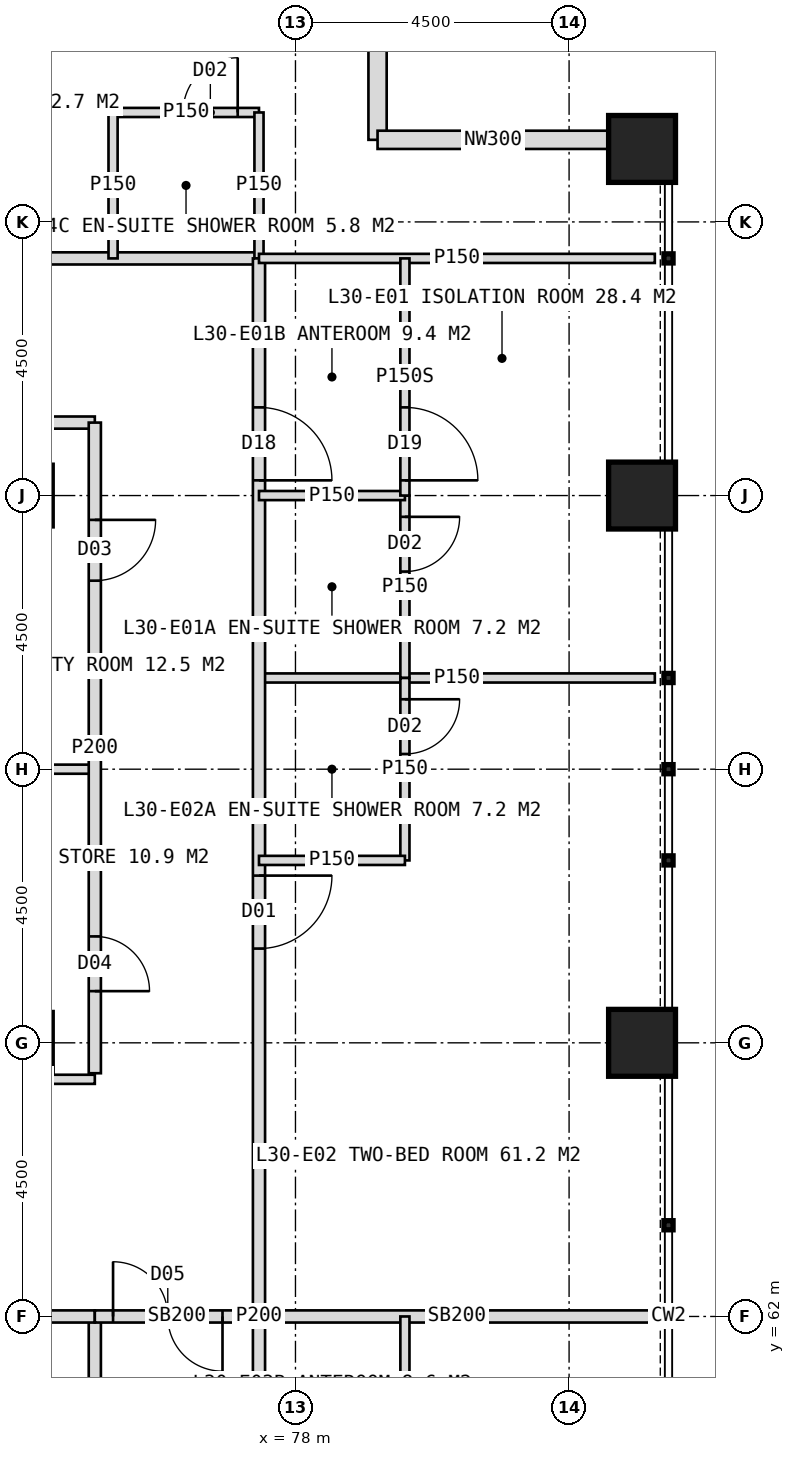
"""IFC4 building model, lengths in metres.
Left out: names, types, materials, properties, quantities, classifications, styles, units other than length and angle.
Written with IfcOpenShell. Run it as: python <this file> out.ifc"""

import sys

from ifc_helpers import new_model, si_unit, direction, frame, frame_2d, origin, origin_2d, place, context, subcontext, project, spatial, rectangle, hollow_rectangle, extrude, element, fill, save


model = new_model("IFC4")
c1 = context("Model", 3, precision=1e-05, world=origin(), true_north=direction((0.0, 1.0)))
c2 = subcontext(c1, "Body", "Model", "MODEL_VIEW")
j1 = project(units=[si_unit("LENGTHUNIT", "METRE"), si_unit("PLANEANGLEUNIT", "RADIAN")], contexts=[c1])
p1 = place(None, origin())
s1 = spatial("IfcSite", under=j1, at=p1, CompositionType="ELEMENT")
p2 = place(p1, origin())
s2 = spatial("IfcBuilding", under=s1, at=p2, CompositionType="ELEMENT")
p3 = place(p2, frame((0.0, 0.0, 128.0)))
s3 = spatial("IfcBuildingStorey", under=s2, at=p3, CompositionType="ELEMENT", Elevation=128.0)
for number, where, z_axis, x_axis in (
    (1, (83.7, 66.5, 0.0), (0.0, 0.0, 1.0), (1.0, 0.0, 0.0)),
    (2, (83.7, 75.5, 0.0), (0.0, 0.0, 1.0), (1.0, 0.0, 0.0)),
    (3, (83.7, 81.2, 0.0), (0.0, 0.0, 1.0), (1.0, 0.0, 0.0)),
):
    element("IfcColumn", number, at=place(p3, frame(where, z_axis=z_axis, x_axis=x_axis)), inside=s3, PredefinedType="COLUMN", context=c2, shape_type="SweptSolid", body=[
        extrude(hollow_rectangle(XDim=1.1, YDim=1.1, WallThickness=0.1, at=origin_2d()), origin(), (0.0, 0.0, 1.0), 4.0),
    ])
for number, where, z_axis, x_axis in (
    (4, (79.35, 85.15, 0.0), (0.0, 0.0, 1.0), (0.0, -1.0, 0.0)),
    (5, (79.35, 81.35, 0.0), (0.0, 0.0, 1.0), (1.0, 0.0, 0.0)),
):
    element("IfcWall", number, at=place(p3, frame(where, z_axis=z_axis, x_axis=x_axis)), inside=s3, PredefinedType="ELEMENTEDWALL", context=c2, shape_type="SweptSolid", body=[
        extrude(rectangle(XDim=3.8, YDim=0.3, at=frame_2d((1.9, 0.0))), origin(), (0.0, 0.0, 1.0), 4.0),
    ])
p4 = place(p3, frame((42.6, 79.4, 0.0), z_axis=(0.0, 0.0, 1.0), x_axis=(1.0, 0.0, 0.0)))
e6 = element("IfcWall", 6, at=p4, inside=s3, PredefinedType="PARTITIONING", context=c2, shape_type="SweptSolid", body=[
    extrude(rectangle(XDim=34.8, YDim=0.2, at=frame_2d((17.4, 0.0))), origin(), (0.0, 0.0, 1.0), 3.75),
])
p5 = place(p4, frame((2.45, 0.0, 0.0)))
e7 = element("IfcOpeningElement", 7, at=p5, cuts=e6, PredefinedType="OPENING", context=c2, shape_type="SweptSolid", body=[
    extrude(rectangle(XDim=1.2, YDim=2.2, at=frame_2d((0.6, 1.1))), frame((0.0, 0.11, 0.0), z_axis=(0.0, -1.0, 0.0), x_axis=(1.0, 0.0, 0.0)), (0.0, 0.0, 1.0), 0.22),
])
p6 = place(p4, frame((10.15, 0.0, 0.0)))
e8 = element("IfcOpeningElement", 8, at=p6, cuts=e6, PredefinedType="OPENING", context=c2, shape_type="SweptSolid", body=[
    extrude(rectangle(XDim=1.2, YDim=2.2, at=frame_2d((0.6, 1.1))), frame((0.0, 0.11, 0.0), z_axis=(0.0, -1.0, 0.0), x_axis=(1.0, 0.0, 0.0)), (0.0, 0.0, 1.0), 0.22),
])
p7 = place(p4, frame((19.8, 0.0, 0.0)))
e9 = element("IfcOpeningElement", 9, at=p7, cuts=e6, PredefinedType="OPENING", context=c2, shape_type="SweptSolid", body=[
    extrude(rectangle(XDim=1.2, YDim=2.2, at=frame_2d((0.6, 1.1))), frame((0.0, 0.11, 0.0), z_axis=(0.0, -1.0, 0.0), x_axis=(1.0, 0.0, 0.0)), (0.0, 0.0, 1.0), 0.22),
])
p8 = place(p4, frame((27.55, 0.0, 0.0)))
e10 = element("IfcOpeningElement", 10, at=p8, cuts=e6, PredefinedType="OPENING", context=c2, shape_type="SweptSolid", body=[
    extrude(rectangle(XDim=1.2, YDim=2.2, at=frame_2d((0.6, 1.1))), frame((0.0, 0.11, 0.0), z_axis=(0.0, -1.0, 0.0), x_axis=(1.0, 0.0, 0.0)), (0.0, 0.0, 1.0), 0.22),
])
p9 = place(p3, frame((75.0, 81.8, 0.0), z_axis=(0.0, 0.0, 1.0), x_axis=(1.0, 0.0, 0.0)))
e11 = element("IfcWall", 11, at=p9, inside=s3, PredefinedType="PARTITIONING", context=c2, shape_type="SweptSolid", body=[
    extrude(rectangle(XDim=2.4, YDim=0.15, at=frame_2d((1.2, 0.0))), origin(), (0.0, 0.0, 1.0), 3.75),
])
p10 = place(p9, frame((1.15, 0.0, 0.0)))
e12 = element("IfcOpeningElement", 12, at=p10, cuts=e11, PredefinedType="OPENING", context=c2, shape_type="SweptSolid", body=[
    extrude(rectangle(XDim=0.9, YDim=2.1, at=frame_2d((0.45, 1.05))), frame((0.0, 0.085, 0.0), z_axis=(0.0, -1.0, 0.0), x_axis=(1.0, 0.0, 0.0)), (0.0, 0.0, 1.0), 0.17),
])
for number, where, z_axis, x_axis in (
    (13, (75.0, 79.4, 0.0), (0.0, 0.0, 1.0), (0.0, 1.0, 0.0)),
    (14, (77.4, 79.4, 0.0), (0.0, 0.0, 1.0), (0.0, 1.0, 0.0)),
):
    element("IfcWall", number, at=place(p3, frame(where, z_axis=z_axis, x_axis=x_axis)), inside=s3, PredefinedType="PARTITIONING", context=c2, shape_type="SweptSolid", body=[
        extrude(rectangle(XDim=2.4, YDim=0.15, at=frame_2d((1.2, 0.0))), origin(), (0.0, 0.0, 1.0), 3.75),
    ])
p11 = place(p3, frame((72.5, 76.7, 0.0), z_axis=(0.0, 0.0, 1.0), x_axis=(1.0, 0.0, 0.0)))
e15 = element("IfcWall", 15, at=p11, inside=s3, PredefinedType="PARTITIONING", context=c2, shape_type="SweptSolid", body=[
    extrude(rectangle(XDim=2.2, YDim=0.2, at=frame_2d((1.1, 0.0))), origin(), (0.0, 0.0, 1.0), 3.75),
])
p12 = place(p3, frame((77.4, 72.5, 0.0), z_axis=(0.0, 0.0, 1.0), x_axis=(1.0, 0.0, 0.0)))
e16 = element("IfcWall", 16, at=p12, inside=s3, PredefinedType="PARTITIONING", context=c2, shape_type="SweptSolid", body=[
    extrude(rectangle(XDim=6.51, YDim=0.15, at=frame_2d((3.255, 0.0))), origin(), (0.0, 0.0, 1.0), 3.75),
])
p13 = place(p3, frame((77.4, 62.0, 0.0), z_axis=(0.0, 0.0, 1.0), x_axis=(1.0, 0.0, 0.0)))
e17 = element("IfcWall", 17, at=p13, inside=s3, PredefinedType="SOLIDWALL", context=c2, shape_type="SweptSolid", body=[
    extrude(rectangle(XDim=6.51, YDim=0.2, at=frame_2d((3.255, 0.0))), origin(), (0.0, 0.0, 1.0), 2.95),
])
p14 = place(p3, frame((77.4, 79.4, 0.0), z_axis=(0.0, 0.0, 1.0), x_axis=(0.0, -1.0, 0.0)))
e18 = element("IfcWall", 18, at=p14, inside=s3, PredefinedType="PARTITIONING", context=c2, shape_type="SweptSolid", body=[
    extrude(rectangle(XDim=34.8, YDim=0.2, at=frame_2d((17.4, 0.0))), origin(), (0.0, 0.0, 1.0), 3.75),
])
p15 = place(p14, frame((2.45, 0.0, 0.0)))
e19 = element("IfcOpeningElement", 19, at=p15, cuts=e18, PredefinedType="OPENING", context=c2, shape_type="SweptSolid", body=[
    extrude(rectangle(XDim=1.2, YDim=2.2, at=frame_2d((0.6, 1.1))), frame((0.0, 0.11, 0.0), z_axis=(0.0, -1.0, 0.0), x_axis=(1.0, 0.0, 0.0)), (0.0, 0.0, 1.0), 0.22),
])
p16 = place(p14, frame((10.15, 0.0, 0.0)))
e20 = element("IfcOpeningElement", 20, at=p16, cuts=e18, PredefinedType="OPENING", context=c2, shape_type="SweptSolid", body=[
    extrude(rectangle(XDim=1.2, YDim=2.2, at=frame_2d((0.6, 1.1))), frame((0.0, 0.11, 0.0), z_axis=(0.0, -1.0, 0.0), x_axis=(1.0, 0.0, 0.0)), (0.0, 0.0, 1.0), 0.22),
])
p17 = place(p14, frame((19.55, 0.0, 0.0)))
e21 = element("IfcOpeningElement", 21, at=p17, cuts=e18, PredefinedType="OPENING", context=c2, shape_type="SweptSolid", body=[
    extrude(rectangle(XDim=1.2, YDim=2.2, at=frame_2d((0.6, 1.1))), frame((0.0, 0.11, 0.0), z_axis=(0.0, -1.0, 0.0), x_axis=(1.0, 0.0, 0.0)), (0.0, 0.0, 1.0), 0.22),
])
p18 = place(p14, frame((26.05, 0.0, 0.0)))
e22 = element("IfcOpeningElement", 22, at=p18, cuts=e18, PredefinedType="OPENING", context=c2, shape_type="SweptSolid", body=[
    extrude(rectangle(XDim=1.2, YDim=2.2, at=frame_2d((0.6, 1.1))), frame((0.0, 0.11, 0.0), z_axis=(0.0, -1.0, 0.0), x_axis=(1.0, 0.0, 0.0)), (0.0, 0.0, 1.0), 0.22),
])
p19 = place(p3, frame((77.4, 79.4, 0.0), z_axis=(0.0, 0.0, 1.0), x_axis=(1.0, 0.0, 0.0)))
e23 = element("IfcWall", 23, at=p19, inside=s3, PredefinedType="PARTITIONING", context=c2, shape_type="SweptSolid", body=[
    extrude(rectangle(XDim=6.51, YDim=0.15, at=frame_2d((3.255, 0.0))), origin(), (0.0, 0.0, 1.0), 3.75),
])
p20 = place(p3, frame((79.8, 75.5, 0.0), z_axis=(0.0, 0.0, 1.0), x_axis=(0.0, -1.0, 0.0)))
e24 = element("IfcWall", 24, at=p20, inside=s3, PredefinedType="PARTITIONING", context=c2, shape_type="SweptSolid", body=[
    extrude(rectangle(XDim=3.0, YDim=0.15, at=frame_2d((1.5, 0.0))), origin(), (0.0, 0.0, 1.0), 3.75),
])
p21 = place(p20, frame((0.35, 0.0, 0.0)))
e25 = element("IfcOpeningElement", 25, at=p21, cuts=e24, PredefinedType="OPENING", context=c2, shape_type="SweptSolid", body=[
    extrude(rectangle(XDim=0.9, YDim=2.1, at=frame_2d((0.45, 1.05))), frame((0.0, 0.085, 0.0), z_axis=(0.0, -1.0, 0.0), x_axis=(1.0, 0.0, 0.0)), (0.0, 0.0, 1.0), 0.17),
])
p22 = place(p3, frame((77.4, 75.5, 0.0), z_axis=(0.0, 0.0, 1.0), x_axis=(1.0, 0.0, 0.0)))
e26 = element("IfcWall", 26, at=p22, inside=s3, PredefinedType="PARTITIONING", context=c2, shape_type="SweptSolid", body=[
    extrude(rectangle(XDim=2.4, YDim=0.15, at=frame_2d((1.2, 0.0))), origin(), (0.0, 0.0, 1.0), 2.95),
])
p23 = place(p3, frame((79.8, 79.4, 0.0), z_axis=(0.0, 0.0, 1.0), x_axis=(0.0, -1.0, 0.0)))
e27 = element("IfcWall", 27, at=p23, inside=s3, PredefinedType="PARTITIONING", context=c2, shape_type="SweptSolid", body=[
    extrude(rectangle(XDim=3.9, YDim=0.15, at=frame_2d((1.95, 0.0))), origin(), (0.0, 0.0, 1.0), 3.75),
])
p24 = place(p23, frame((2.45, 0.0, 0.0)))
e28 = element("IfcOpeningElement", 28, at=p24, cuts=e27, PredefinedType="OPENING", context=c2, shape_type="SweptSolid", body=[
    extrude(rectangle(XDim=1.2, YDim=2.2, at=frame_2d((0.6, 1.1))), frame((0.0, 0.085, 0.0), z_axis=(0.0, -1.0, 0.0), x_axis=(1.0, 0.0, 0.0)), (0.0, 0.0, 1.0), 0.17),
])
p25 = place(p3, frame((79.8, 72.5, 0.0), z_axis=(0.0, 0.0, 1.0), x_axis=(0.0, -1.0, 0.0)))
e29 = element("IfcWall", 29, at=p25, inside=s3, PredefinedType="PARTITIONING", context=c2, shape_type="SweptSolid", body=[
    extrude(rectangle(XDim=3.0, YDim=0.15, at=frame_2d((1.5, 0.0))), origin(), (0.0, 0.0, 1.0), 3.75),
])
p26 = place(p25, frame((0.35, 0.0, 0.0)))
e30 = element("IfcOpeningElement", 30, at=p26, cuts=e29, PredefinedType="OPENING", context=c2, shape_type="SweptSolid", body=[
    extrude(rectangle(XDim=0.9, YDim=2.1, at=frame_2d((0.45, 1.05))), frame((0.0, 0.085, 0.0), z_axis=(0.0, -1.0, 0.0), x_axis=(1.0, 0.0, 0.0)), (0.0, 0.0, 1.0), 0.17),
])
p27 = place(p3, frame((77.4, 69.5, 0.0), z_axis=(0.0, 0.0, 1.0), x_axis=(1.0, 0.0, 0.0)))
e31 = element("IfcWall", 31, at=p27, inside=s3, PredefinedType="PARTITIONING", context=c2, shape_type="SweptSolid", body=[
    extrude(rectangle(XDim=2.4, YDim=0.15, at=frame_2d((1.2, 0.0))), origin(), (0.0, 0.0, 1.0), 3.75),
])
p28 = place(p3, frame((79.8, 62.0, 0.0), z_axis=(0.0, 0.0, 1.0), x_axis=(0.0, -1.0, 0.0)))
e32 = element("IfcWall", 32, at=p28, inside=s3, PredefinedType="PARTITIONING", context=c2, shape_type="SweptSolid", body=[
    extrude(rectangle(XDim=3.6, YDim=0.15, at=frame_2d((1.8, 0.0))), origin(), (0.0, 0.0, 1.0), 3.75),
])
p29 = place(p28, frame((2.15, 0.0, 0.0)))
e33 = element("IfcOpeningElement", 33, at=p29, cuts=e32, PredefinedType="OPENING", context=c2, shape_type="SweptSolid", body=[
    extrude(rectangle(XDim=1.2, YDim=2.2, at=frame_2d((0.6, 1.1))), frame((0.0, 0.085, 0.0), z_axis=(0.0, -1.0, 0.0), x_axis=(1.0, 0.0, 0.0)), (0.0, 0.0, 1.0), 0.17),
])
p30 = place(p3, frame((72.5, 71.0, 0.0), z_axis=(0.0, 0.0, 1.0), x_axis=(1.0, 0.0, 0.0)))
e34 = element("IfcWall", 34, at=p30, inside=s3, PredefinedType="PARTITIONING", context=c2, shape_type="SweptSolid", body=[
    extrude(rectangle(XDim=2.2, YDim=0.15, at=frame_2d((1.1, 0.0))), origin(), (0.0, 0.0, 1.0), 3.75),
])
p31 = place(p3, frame((74.7, 76.7, 0.0), z_axis=(0.0, 0.0, 1.0), x_axis=(0.0, -1.0, 0.0)))
e35 = element("IfcWall", 35, at=p31, inside=s3, PredefinedType="PARTITIONING", context=c2, shape_type="SweptSolid", body=[
    extrude(rectangle(XDim=10.7, YDim=0.2, at=frame_2d((5.35, 0.0))), origin(), (0.0, 0.0, 1.0), 3.75),
])
p32 = place(p31, frame((1.6, 0.0, 0.0)))
e36 = element("IfcOpeningElement", 36, at=p32, cuts=e35, PredefinedType="OPENING", context=c2, shape_type="SweptSolid", body=[
    extrude(rectangle(XDim=1.0, YDim=2.1, at=frame_2d((0.5, 1.05))), frame((0.0, 0.11, 0.0), z_axis=(0.0, -1.0, 0.0), x_axis=(1.0, 0.0, 0.0)), (0.0, 0.0, 1.0), 0.22),
])
p33 = place(p31, frame((8.45, 0.0, 0.0)))
e37 = element("IfcOpeningElement", 37, at=p33, cuts=e35, PredefinedType="OPENING", context=c2, shape_type="SweptSolid", body=[
    extrude(rectangle(XDim=0.9, YDim=2.1, at=frame_2d((0.45, 1.05))), frame((0.0, 0.11, 0.0), z_axis=(0.0, -1.0, 0.0), x_axis=(1.0, 0.0, 0.0)), (0.0, 0.0, 1.0), 0.22),
])
p34 = place(p3, frame((74.7, 62.0, 0.0), z_axis=(0.0, 0.0, 1.0), x_axis=(0.0, -1.0, 0.0)))
e38 = element("IfcWall", 38, at=p34, inside=s3, PredefinedType="PARTITIONING", context=c2, shape_type="SweptSolid", body=[
    extrude(rectangle(XDim=14.7, YDim=0.2, at=frame_2d((7.35, 0.0))), origin(), (0.0, 0.0, 1.0), 3.75),
])
p35 = place(p34, frame((1.45, 0.0, 0.0)))
e39 = element("IfcOpeningElement", 39, at=p35, cuts=e38, PredefinedType="OPENING", context=c2, shape_type="SweptSolid", body=[
    extrude(rectangle(XDim=1.0, YDim=2.1, at=frame_2d((0.5, 1.05))), frame((0.0, 0.11, 0.0), z_axis=(0.0, -1.0, 0.0), x_axis=(1.0, 0.0, 0.0)), (0.0, 0.0, 1.0), 0.22),
])
p36 = place(p34, frame((11.35, 0.0, 0.0)))
e40 = element("IfcOpeningElement", 40, at=p36, cuts=e38, PredefinedType="OPENING", context=c2, shape_type="SweptSolid", body=[
    extrude(rectangle(XDim=1.0, YDim=2.1, at=frame_2d((0.5, 1.05))), frame((0.0, 0.11, 0.0), z_axis=(0.0, -1.0, 0.0), x_axis=(1.0, 0.0, 0.0)), (0.0, 0.0, 1.0), 0.22),
])
p37 = place(p3, frame((72.5, 65.9, 0.0), z_axis=(0.0, 0.0, 1.0), x_axis=(1.0, 0.0, 0.0)))
e41 = element("IfcWall", 41, at=p37, inside=s3, PredefinedType="PARTITIONING", context=c2, shape_type="SweptSolid", body=[
    extrude(rectangle(XDim=2.2, YDim=0.15, at=frame_2d((1.1, 0.0))), origin(), (0.0, 0.0, 1.0), 3.75),
])
p38 = place(p3, frame((69.0, 62.0, 0.0), z_axis=(0.0, 0.0, 1.0), x_axis=(1.0, 0.0, 0.0)))
e42 = element("IfcWall", 42, at=p38, inside=s3, PredefinedType="SOLIDWALL", context=c2, shape_type="SweptSolid", body=[
    extrude(rectangle(XDim=5.7, YDim=0.2, at=frame_2d((2.85, 0.0))), origin(), (0.0, 0.0, 1.0), 2.95),
])
p39 = place(p3, frame((74.7, 62.0, 0.0), z_axis=(0.0, 0.0, 1.0), x_axis=(1.0, 0.0, 0.0)))
e43 = element("IfcWall", 43, at=p39, inside=s3, PredefinedType="SOLIDWALL", context=c2, shape_type="SweptSolid", body=[
    extrude(rectangle(XDim=2.7, YDim=0.2, at=frame_2d((1.35, 0.0))), origin(), (0.0, 0.0, 1.0), 2.95),
])
p40 = place(p39, frame((0.3, 0.0, 0.0)))
e44 = element("IfcOpeningElement", 44, at=p40, cuts=e43, PredefinedType="OPENING", context=c2, shape_type="SweptSolid", body=[
    extrude(rectangle(XDim=1.8, YDim=2.2, at=frame_2d((0.9, 1.1))), frame((0.0, 0.11, 0.0), z_axis=(0.0, -1.0, 0.0), x_axis=(1.0, 0.0, 0.0)), (0.0, 0.0, 1.0), 0.22),
])
p41 = place(p10, origin())
e45 = element("IfcDoor", 45, at=p41, inside=s3, OperationType="SINGLE_SWING_RIGHT", PredefinedType="DOOR", context=c2, shape_type="SweptSolid", body=[
    extrude(rectangle(XDim=0.9, YDim=2.1, at=frame_2d((0.45, 1.05))), frame((0.0, 0.025, 0.0), z_axis=(0.0, -1.0, 0.0), x_axis=(1.0, 0.0, 0.0)), (0.0, 0.0, 1.0), 0.05),
])
fill(e12, e45)
p42 = place(p32, origin())
e46 = element("IfcDoor", 46, at=p42, inside=s3, OperationType="SINGLE_SWING_LEFT", PredefinedType="DOOR", context=c2, shape_type="SweptSolid", body=[
    extrude(rectangle(XDim=1.0, YDim=2.1, at=frame_2d((0.5, 1.05))), frame((0.0, 0.025, 0.0), z_axis=(0.0, -1.0, 0.0), x_axis=(1.0, 0.0, 0.0)), (0.0, 0.0, 1.0), 0.05),
])
fill(e36, e46)
p43 = place(p24, origin())
e47 = element("IfcDoor", 47, at=p43, inside=s3, OperationType="SINGLE_SWING_RIGHT", PredefinedType="DOOR", context=c2, shape_type="SweptSolid", body=[
    extrude(rectangle(XDim=1.2, YDim=2.2, at=frame_2d((0.6, 1.1))), frame((0.0, 0.025, 0.0), z_axis=(0.0, -1.0, 0.0), x_axis=(1.0, 0.0, 0.0)), (0.0, 0.0, 1.0), 0.05),
])
fill(e28, e47)
p44 = place(p15, origin())
e48 = element("IfcDoor", 48, at=p44, inside=s3, OperationType="SINGLE_SWING_RIGHT", PredefinedType="DOOR", context=c2, shape_type="SweptSolid", body=[
    extrude(rectangle(XDim=1.2, YDim=2.2, at=frame_2d((0.6, 1.1))), frame((0.0, 0.025, 0.0), z_axis=(0.0, -1.0, 0.0), x_axis=(1.0, 0.0, 0.0)), (0.0, 0.0, 1.0), 0.05),
])
fill(e19, e48)
p45 = place(p21, origin())
e49 = element("IfcDoor", 49, at=p45, inside=s3, OperationType="SINGLE_SWING_LEFT", PredefinedType="DOOR", context=c2, shape_type="SweptSolid", body=[
    extrude(rectangle(XDim=0.9, YDim=2.1, at=frame_2d((0.45, 1.05))), frame((0.0, 0.025, 0.0), z_axis=(0.0, -1.0, 0.0), x_axis=(1.0, 0.0, 0.0)), (0.0, 0.0, 1.0), 0.05),
])
fill(e25, e49)
p46 = place(p16, origin())
e50 = element("IfcDoor", 50, at=p46, inside=s3, OperationType="SINGLE_SWING_LEFT", PredefinedType="DOOR", context=c2, shape_type="SweptSolid", body=[
    extrude(rectangle(XDim=1.2, YDim=2.2, at=frame_2d((0.6, 1.1))), frame((0.0, 0.025, 0.0), z_axis=(0.0, -1.0, 0.0), x_axis=(1.0, 0.0, 0.0)), (0.0, 0.0, 1.0), 0.05),
])
fill(e20, e50)
p47 = place(p26, origin())
e51 = element("IfcDoor", 51, at=p47, inside=s3, OperationType="SINGLE_SWING_LEFT", PredefinedType="DOOR", context=c2, shape_type="SweptSolid", body=[
    extrude(rectangle(XDim=0.9, YDim=2.1, at=frame_2d((0.45, 1.05))), frame((0.0, 0.025, 0.0), z_axis=(0.0, -1.0, 0.0), x_axis=(1.0, 0.0, 0.0)), (0.0, 0.0, 1.0), 0.05),
])
fill(e30, e51)
p48 = place(p33, origin())
e52 = element("IfcDoor", 52, at=p48, inside=s3, OperationType="SINGLE_SWING_RIGHT", PredefinedType="DOOR", context=c2, shape_type="SweptSolid", body=[
    extrude(rectangle(XDim=0.9, YDim=2.1, at=frame_2d((0.45, 1.05))), frame((0.0, 0.025, 0.0), z_axis=(0.0, -1.0, 0.0), x_axis=(1.0, 0.0, 0.0)), (0.0, 0.0, 1.0), 0.05),
])
fill(e37, e52)
p49 = place(p40, origin())
e53 = element("IfcDoor", 53, at=p49, inside=s3, OperationType="DOUBLE_DOOR_DOUBLE_SWING", PredefinedType="DOOR", context=c2, shape_type="SweptSolid", body=[
    extrude(rectangle(XDim=1.8, YDim=2.2, at=frame_2d((0.9, 1.1))), frame((0.0, 0.025, 0.0), z_axis=(0.0, -1.0, 0.0), x_axis=(1.0, 0.0, 0.0)), (0.0, 0.0, 1.0), 0.05),
])
fill(e44, e53)
save(model, sys.argv[1])
